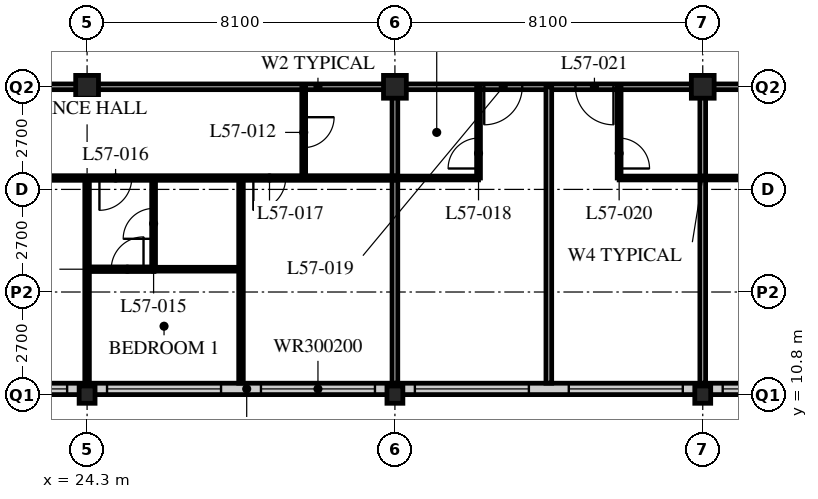
"""IFC4 building model, lengths in metres.
Left out: names, types, materials, properties, quantities, classifications, styles, units other than length and angle.
Written with IfcOpenShell. Run it as: python <this file> out.ifc"""

import sys

from ifc_helpers import new_model, si_unit, direction, frame, frame_2d, origin, origin_2d, place, context, subcontext, project, spatial, rectangle, hollow_rectangle, i_section, extrude, element, fill, save


model = new_model("IFC4")
c1 = context("Model", 3, precision=1e-05, world=origin(), true_north=direction((0.0, 1.0)))
c2 = subcontext(c1, "Body", "Model", "MODEL_VIEW")
j1 = project(units=[si_unit("LENGTHUNIT", "METRE"), si_unit("PLANEANGLEUNIT", "RADIAN")], contexts=[c1])
p1 = place(None, origin())
s1 = spatial("IfcSite", under=j1, at=p1, CompositionType="ELEMENT")
p2 = place(p1, origin())
s2 = spatial("IfcBuilding", under=s1, at=p2, CompositionType="ELEMENT")
p3 = place(p2, frame((0.0, 0.0, 220.8)))
s3 = spatial("IfcBuildingStorey", under=s2, at=p3, CompositionType="ELEMENT", Elevation=220.8)
p4 = place(p3, frame((24.3, 10.8, 0.0), z_axis=(0.0, 0.0, 1.0), x_axis=(1.0, 0.0, 0.0)))
e1 = element("IfcColumn", 1, at=p4, inside=s3, PredefinedType="COLUMN", context=c2, shape_type="SweptSolid", body=[
    extrude(i_section(OverallWidth=0.418, OverallDepth=0.456, WebThickness=0.042, FlangeThickness=0.067, FilletRadius=0.015, at=origin_2d()), origin(), (0.0, 0.0, 1.0), 3.6),
])
p5 = place(p3, frame((24.3, 18.9, 0.0), z_axis=(0.0, 0.0, 1.0), x_axis=(1.0, 0.0, 0.0)))
e2 = element("IfcColumn", 2, at=p5, inside=s3, PredefinedType="COLUMN", context=c2, shape_type="SweptSolid", body=[
    extrude(hollow_rectangle(XDim=0.6, YDim=0.6, WallThickness=0.05, at=origin_2d()), origin(), (0.0, 0.0, 1.0), 3.6),
])
p6 = place(p3, frame((32.4, 10.8, 0.0), z_axis=(0.0, 0.0, 1.0), x_axis=(1.0, 0.0, 0.0)))
e3 = element("IfcColumn", 3, at=p6, inside=s3, PredefinedType="COLUMN", context=c2, shape_type="SweptSolid", body=[
    extrude(i_section(OverallWidth=0.418, OverallDepth=0.456, WebThickness=0.042, FlangeThickness=0.067, FilletRadius=0.015, at=origin_2d()), origin(), (0.0, 0.0, 1.0), 3.6),
])
p7 = place(p3, frame((32.4, 18.9, 0.0), z_axis=(0.0, 0.0, 1.0), x_axis=(1.0, 0.0, 0.0)))
e4 = element("IfcColumn", 4, at=p7, inside=s3, PredefinedType="COLUMN", context=c2, shape_type="SweptSolid", body=[
    extrude(hollow_rectangle(XDim=0.6, YDim=0.6, WallThickness=0.05, at=origin_2d()), origin(), (0.0, 0.0, 1.0), 3.6),
])
p8 = place(p3, frame((40.5, 10.8, 0.0), z_axis=(0.0, 0.0, 1.0), x_axis=(1.0, 0.0, 0.0)))
e5 = element("IfcColumn", 5, at=p8, inside=s3, PredefinedType="COLUMN", context=c2, shape_type="SweptSolid", body=[
    extrude(i_section(OverallWidth=0.418, OverallDepth=0.456, WebThickness=0.042, FlangeThickness=0.067, FilletRadius=0.015, at=origin_2d()), origin(), (0.0, 0.0, 1.0), 3.6),
])
p9 = place(p3, frame((40.5, 18.9, 0.0), z_axis=(0.0, 0.0, 1.0), x_axis=(1.0, 0.0, 0.0)))
e6 = element("IfcColumn", 6, at=p9, inside=s3, PredefinedType="COLUMN", context=c2, shape_type="SweptSolid", body=[
    extrude(hollow_rectangle(XDim=0.6, YDim=0.6, WallThickness=0.05, at=origin_2d()), origin(), (0.0, 0.0, 1.0), 3.6),
])
p10 = place(p3, frame((8.4, 10.95, 0.0), z_axis=(0.0, 0.0, 1.0), x_axis=(1.0, 0.0, 0.0)))
e7 = element("IfcWall", 7, at=p10, inside=s3, PredefinedType="SOLIDWALL", context=c2, shape_type="SweptSolid", body=[
    extrude(rectangle(XDim=40.2, YDim=0.3, at=frame_2d((20.1, 0.0))), origin(), (0.0, 0.0, 1.0), 3.39),
])
p11 = place(p10, frame((0.225, 0.0, 0.6)))
e8 = element("IfcOpeningElement", 8, at=p11, cuts=e7, PredefinedType="OPENING", context=c2, shape_type="SweptSolid", body=[
    extrude(rectangle(XDim=3.0, YDim=2.0, at=frame_2d((1.5, 1.0))), frame((0.0, 0.16, 0.0), z_axis=(0.0, -1.0, 0.0), x_axis=(1.0, 0.0, 0.0)), (0.0, 0.0, 1.0), 0.32),
])
p12 = place(p10, frame((4.275, 0.0, 0.6)))
e9 = element("IfcOpeningElement", 9, at=p12, cuts=e7, PredefinedType="OPENING", context=c2, shape_type="SweptSolid", body=[
    extrude(rectangle(XDim=3.0, YDim=2.0, at=frame_2d((1.5, 1.0))), frame((0.0, 0.16, 0.0), z_axis=(0.0, -1.0, 0.0), x_axis=(1.0, 0.0, 0.0)), (0.0, 0.0, 1.0), 0.32),
])
p13 = place(p10, frame((8.325, 0.0, 0.6)))
e10 = element("IfcOpeningElement", 10, at=p13, cuts=e7, PredefinedType="OPENING", context=c2, shape_type="SweptSolid", body=[
    extrude(rectangle(XDim=3.0, YDim=2.0, at=frame_2d((1.5, 1.0))), frame((0.0, 0.16, 0.0), z_axis=(0.0, -1.0, 0.0), x_axis=(1.0, 0.0, 0.0)), (0.0, 0.0, 1.0), 0.32),
])
p14 = place(p10, frame((12.375, 0.0, 0.6)))
e11 = element("IfcOpeningElement", 11, at=p14, cuts=e7, PredefinedType="OPENING", context=c2, shape_type="SweptSolid", body=[
    extrude(rectangle(XDim=3.0, YDim=2.0, at=frame_2d((1.5, 1.0))), frame((0.0, 0.16, 0.0), z_axis=(0.0, -1.0, 0.0), x_axis=(1.0, 0.0, 0.0)), (0.0, 0.0, 1.0), 0.32),
])
p15 = place(p10, frame((16.425, 0.0, 0.6)))
e12 = element("IfcOpeningElement", 12, at=p15, cuts=e7, PredefinedType="OPENING", context=c2, shape_type="SweptSolid", body=[
    extrude(rectangle(XDim=3.0, YDim=2.0, at=frame_2d((1.5, 1.0))), frame((0.0, 0.16, 0.0), z_axis=(0.0, -1.0, 0.0), x_axis=(1.0, 0.0, 0.0)), (0.0, 0.0, 1.0), 0.32),
])
p16 = place(p10, frame((20.475, 0.0, 0.6)))
e13 = element("IfcOpeningElement", 13, at=p16, cuts=e7, PredefinedType="OPENING", context=c2, shape_type="SweptSolid", body=[
    extrude(rectangle(XDim=3.0, YDim=2.0, at=frame_2d((1.5, 1.0))), frame((0.0, 0.16, 0.0), z_axis=(0.0, -1.0, 0.0), x_axis=(1.0, 0.0, 0.0)), (0.0, 0.0, 1.0), 0.32),
])
p17 = place(p10, frame((24.525, 0.0, 0.6)))
e14 = element("IfcOpeningElement", 14, at=p17, cuts=e7, PredefinedType="OPENING", context=c2, shape_type="SweptSolid", body=[
    extrude(rectangle(XDim=3.0, YDim=2.0, at=frame_2d((1.5, 1.0))), frame((0.0, 0.16, 0.0), z_axis=(0.0, -1.0, 0.0), x_axis=(1.0, 0.0, 0.0)), (0.0, 0.0, 1.0), 0.32),
])
p18 = place(p10, frame((28.575, 0.0, 0.6)))
e15 = element("IfcOpeningElement", 15, at=p18, cuts=e7, PredefinedType="OPENING", context=c2, shape_type="SweptSolid", body=[
    extrude(rectangle(XDim=3.0, YDim=2.0, at=frame_2d((1.5, 1.0))), frame((0.0, 0.16, 0.0), z_axis=(0.0, -1.0, 0.0), x_axis=(1.0, 0.0, 0.0)), (0.0, 0.0, 1.0), 0.32),
])
p19 = place(p10, frame((32.625, 0.0, 0.6)))
e16 = element("IfcOpeningElement", 16, at=p19, cuts=e7, PredefinedType="OPENING", context=c2, shape_type="SweptSolid", body=[
    extrude(rectangle(XDim=3.0, YDim=2.0, at=frame_2d((1.5, 1.0))), frame((0.0, 0.16, 0.0), z_axis=(0.0, -1.0, 0.0), x_axis=(1.0, 0.0, 0.0)), (0.0, 0.0, 1.0), 0.32),
])
p20 = place(p10, frame((36.675, 0.0, 0.6)))
e17 = element("IfcOpeningElement", 17, at=p20, cuts=e7, PredefinedType="OPENING", context=c2, shape_type="SweptSolid", body=[
    extrude(rectangle(XDim=3.0, YDim=2.0, at=frame_2d((1.5, 1.0))), frame((0.0, 0.16, 0.0), z_axis=(0.0, -1.0, 0.0), x_axis=(1.0, 0.0, 0.0)), (0.0, 0.0, 1.0), 0.32),
])
p21 = place(p3, frame((12.15, 18.9, 0.0), z_axis=(0.0, 0.0, 1.0), x_axis=(1.0, 0.0, 0.0)))
e18 = element("IfcWall", 18, at=p21, inside=s3, PredefinedType="PARTITIONING", context=c2, shape_type="SweptSolid", body=[
    extrude(rectangle(XDim=36.45, YDim=0.15, at=frame_2d((18.225, 0.0))), origin(), (0.0, 0.0, 1.0), 2.628),
])
p22 = place(p21, frame((4.95, 0.0, 0.0)))
e19 = element("IfcOpeningElement", 19, at=p22, cuts=e18, PredefinedType="OPENING", context=c2, shape_type="SweptSolid", body=[
    extrude(rectangle(XDim=1.0, YDim=2.1, at=frame_2d((0.5, 1.05))), frame((0.0, 0.085, 0.0), z_axis=(0.0, -1.0, 0.0), x_axis=(1.0, 0.0, 0.0)), (0.0, 0.0, 1.0), 0.17),
])
p23 = place(p21, frame((22.6, 0.0, 0.0)))
e20 = element("IfcOpeningElement", 20, at=p23, cuts=e18, PredefinedType="OPENING", context=c2, shape_type="SweptSolid", body=[
    extrude(rectangle(XDim=1.0, YDim=2.1, at=frame_2d((0.5, 1.05))), frame((0.0, 0.085, 0.0), z_axis=(0.0, -1.0, 0.0), x_axis=(1.0, 0.0, 0.0)), (0.0, 0.0, 1.0), 0.17),
])
p24 = place(p21, frame((25.0, 0.0, 0.0)))
e21 = element("IfcOpeningElement", 21, at=p24, cuts=e18, PredefinedType="OPENING", context=c2, shape_type="SweptSolid", body=[
    extrude(rectangle(XDim=1.0, YDim=2.1, at=frame_2d((0.5, 1.05))), frame((0.0, 0.085, 0.0), z_axis=(0.0, -1.0, 0.0), x_axis=(1.0, 0.0, 0.0)), (0.0, 0.0, 1.0), 0.17),
])
p25 = place(p21, frame((30.7, 0.0, 0.0)))
e22 = element("IfcOpeningElement", 22, at=p25, cuts=e18, PredefinedType="OPENING", context=c2, shape_type="SweptSolid", body=[
    extrude(rectangle(XDim=1.0, YDim=2.1, at=frame_2d((0.5, 1.05))), frame((0.0, 0.085, 0.0), z_axis=(0.0, -1.0, 0.0), x_axis=(1.0, 0.0, 0.0)), (0.0, 0.0, 1.0), 0.17),
])
p26 = place(p21, frame((1.525, 0.0, 0.0)))
e23 = element("IfcOpeningElement", 23, at=p26, cuts=e18, PredefinedType="OPENING", context=c2, shape_type="SweptSolid", body=[
    extrude(rectangle(XDim=1.0, YDim=2.1, at=frame_2d((0.5, 1.05))), frame((0.0, 0.085, 0.0), z_axis=(0.0, -1.0, 0.0), x_axis=(1.0, 0.0, 0.0)), (0.0, 0.0, 1.0), 0.17),
])
p27 = place(p21, frame((32.825, 0.0, 0.0)))
e24 = element("IfcOpeningElement", 24, at=p27, cuts=e18, PredefinedType="OPENING", context=c2, shape_type="SweptSolid", body=[
    extrude(rectangle(XDim=1.0, YDim=2.1, at=frame_2d((0.5, 1.05))), frame((0.0, 0.085, 0.0), z_axis=(0.0, -1.0, 0.0), x_axis=(1.0, 0.0, 0.0)), (0.0, 0.0, 1.0), 0.17),
])
p28 = place(p3, frame((30.0, 18.9, 0.0), z_axis=(0.0, 0.0, 1.0), x_axis=(0.0, -1.0, 0.0)))
e25 = element("IfcWall", 25, at=p28, inside=s3, PredefinedType="PARTITIONING", context=c2, shape_type="SweptSolid", body=[
    extrude(rectangle(XDim=2.4, YDim=0.1, at=frame_2d((1.2, 0.0))), origin(), (0.0, 0.0, 1.0), 3.39),
])
p29 = place(p28, frame((0.8, 0.0, 0.0)))
e26 = element("IfcOpeningElement", 26, at=p29, cuts=e25, PredefinedType="OPENING", context=c2, shape_type="SweptSolid", body=[
    extrude(rectangle(XDim=0.8, YDim=2.1, at=frame_2d((0.4, 1.05))), frame((0.0, 0.06, 0.0), z_axis=(0.0, -1.0, 0.0), x_axis=(1.0, 0.0, 0.0)), (0.0, 0.0, 1.0), 0.12),
])
p30 = place(p3, frame((26.05, 16.5, 0.0), z_axis=(0.0, 0.0, 1.0), x_axis=(0.0, -1.0, 0.0)))
e27 = element("IfcWall", 27, at=p30, inside=s3, PredefinedType="PARTITIONING", context=c2, shape_type="SweptSolid", body=[
    extrude(rectangle(XDim=2.4, YDim=0.1, at=frame_2d((1.2, 0.0))), origin(), (0.0, 0.0, 1.0), 3.39),
])
p31 = place(p30, frame((0.8, 0.0, 0.0)))
e28 = element("IfcOpeningElement", 28, at=p31, cuts=e27, PredefinedType="OPENING", context=c2, shape_type="SweptSolid", body=[
    extrude(rectangle(XDim=0.8, YDim=2.1, at=frame_2d((0.4, 1.05))), frame((0.0, 0.06, 0.0), z_axis=(0.0, -1.0, 0.0), x_axis=(1.0, 0.0, 0.0)), (0.0, 0.0, 1.0), 0.12),
])
p32 = place(p3, frame((26.05, 14.1, 0.0), z_axis=(0.0, 0.0, 1.0), x_axis=(1.0, 0.0, 0.0)))
e29 = element("IfcWall", 29, at=p32, inside=s3, PredefinedType="PARTITIONING", context=c2, shape_type="SweptSolid", body=[
    extrude(rectangle(XDim=2.3, YDim=0.1, at=frame_2d((1.15, 0.0))), origin(), (0.0, 0.0, 1.0), 3.39),
])
p33 = place(p3, frame((24.3, 16.5, 0.0), z_axis=(0.0, 0.0, 1.0), x_axis=(0.0, -1.0, 0.0)))
e30 = element("IfcWall", 30, at=p33, inside=s3, PredefinedType="PARTITIONING", context=c2, shape_type="SweptSolid", body=[
    extrude(rectangle(XDim=5.4, YDim=0.12, at=frame_2d((2.7, 0.0))), origin(), (0.0, 0.0, 1.0), 2.628),
])
p34 = place(p3, frame((28.35, 16.5, 0.0), z_axis=(0.0, 0.0, 1.0), x_axis=(0.0, -1.0, 0.0)))
e31 = element("IfcWall", 31, at=p34, inside=s3, PredefinedType="PARTITIONING", context=c2, shape_type="SweptSolid", body=[
    extrude(rectangle(XDim=5.4, YDim=0.12, at=frame_2d((2.7, 0.0))), origin(), (0.0, 0.0, 1.0), 3.39),
])
p35 = place(p3, frame((32.4, 18.9, 0.0), z_axis=(0.0, 0.0, 1.0), x_axis=(0.0, -1.0, 0.0)))
e32 = element("IfcWall", 32, at=p35, inside=s3, PredefinedType="PARTITIONING", context=c2, shape_type="SweptSolid", body=[
    extrude(rectangle(XDim=7.8, YDim=0.15, at=frame_2d((3.9, 0.0))), origin(), (0.0, 0.0, 1.0), 2.628),
])
p36 = place(p3, frame((32.4, 16.5, 0.0), z_axis=(0.0, 0.0, 1.0), x_axis=(1.0, 0.0, 0.0)))
e33 = element("IfcWall", 33, at=p36, inside=s3, PredefinedType="PARTITIONING", context=c2, shape_type="SweptSolid", body=[
    extrude(rectangle(XDim=2.2, YDim=0.1, at=frame_2d((1.1, 0.0))), origin(), (0.0, 0.0, 1.0), 3.39),
])
p37 = place(p3, frame((34.6, 18.9, 0.0), z_axis=(0.0, 0.0, 1.0), x_axis=(0.0, -1.0, 0.0)))
e34 = element("IfcWall", 34, at=p37, inside=s3, PredefinedType="PARTITIONING", context=c2, shape_type="SweptSolid", body=[
    extrude(rectangle(XDim=2.4, YDim=0.1, at=frame_2d((1.2, 0.0))), origin(), (0.0, 0.0, 1.0), 3.39),
])
p38 = place(p37, frame((1.35, 0.0, 0.0)))
e35 = element("IfcOpeningElement", 35, at=p38, cuts=e34, PredefinedType="OPENING", context=c2, shape_type="SweptSolid", body=[
    extrude(rectangle(XDim=0.8, YDim=2.1, at=frame_2d((0.4, 1.05))), frame((0.0, 0.06, 0.0), z_axis=(0.0, -1.0, 0.0), x_axis=(1.0, 0.0, 0.0)), (0.0, 0.0, 1.0), 0.12),
])
p39 = place(p3, frame((36.45, 18.9, 0.0), z_axis=(0.0, 0.0, 1.0), x_axis=(0.0, -1.0, 0.0)))
e36 = element("IfcWall", 36, at=p39, inside=s3, PredefinedType="PARTITIONING", context=c2, shape_type="SweptSolid", body=[
    extrude(rectangle(XDim=7.8, YDim=0.15, at=frame_2d((3.9, 0.0))), origin(), (0.0, 0.0, 1.0), 3.39),
])
p40 = place(p3, frame((38.3, 16.5, 0.0), z_axis=(0.0, 0.0, 1.0), x_axis=(1.0, 0.0, 0.0)))
e37 = element("IfcWall", 37, at=p40, inside=s3, PredefinedType="PARTITIONING", context=c2, shape_type="SweptSolid", body=[
    extrude(rectangle(XDim=4.4, YDim=0.1, at=frame_2d((2.2, 0.0))), origin(), (0.0, 0.0, 1.0), 3.39),
])
p41 = place(p3, frame((38.3, 18.9, 0.0), z_axis=(0.0, 0.0, 1.0), x_axis=(0.0, -1.0, 0.0)))
e38 = element("IfcWall", 38, at=p41, inside=s3, PredefinedType="PARTITIONING", context=c2, shape_type="SweptSolid", body=[
    extrude(rectangle(XDim=2.4, YDim=0.1, at=frame_2d((1.2, 0.0))), origin(), (0.0, 0.0, 1.0), 3.39),
])
p42 = place(p41, frame((1.35, 0.0, 0.0)))
e39 = element("IfcOpeningElement", 39, at=p42, cuts=e38, PredefinedType="OPENING", context=c2, shape_type="SweptSolid", body=[
    extrude(rectangle(XDim=0.8, YDim=2.1, at=frame_2d((0.4, 1.05))), frame((0.0, 0.06, 0.0), z_axis=(0.0, -1.0, 0.0), x_axis=(1.0, 0.0, 0.0)), (0.0, 0.0, 1.0), 0.12),
])
p43 = place(p3, frame((40.5, 18.9, 0.0), z_axis=(0.0, 0.0, 1.0), x_axis=(0.0, -1.0, 0.0)))
e40 = element("IfcWall", 40, at=p43, inside=s3, PredefinedType="PARTITIONING", context=c2, shape_type="SweptSolid", body=[
    extrude(rectangle(XDim=7.8, YDim=0.15, at=frame_2d((3.9, 0.0))), origin(), (0.0, 0.0, 1.0), 2.628),
])
p44 = place(p3, frame((8.15, 16.5, 0.0), z_axis=(0.0, 0.0, 1.0), x_axis=(1.0, 0.0, 0.0)))
e41 = element("IfcWall", 41, at=p44, inside=s3, PredefinedType="PARTITIONING", context=c2, shape_type="SweptSolid", body=[
    extrude(rectangle(XDim=24.25, YDim=0.12, at=frame_2d((12.125, 0.0))), origin(), (0.0, 0.0, 1.0), 3.39),
])
p45 = place(p44, frame((9.025, 0.0, 0.0)))
e42 = element("IfcOpeningElement", 42, at=p45, cuts=e41, PredefinedType="OPENING", context=c2, shape_type="SweptSolid", body=[
    extrude(rectangle(XDim=0.85, YDim=2.1, at=frame_2d((0.425, 1.05))), frame((0.0, 0.07, 0.0), z_axis=(0.0, -1.0, 0.0), x_axis=(1.0, 0.0, 0.0)), (0.0, 0.0, 1.0), 0.14),
])
p46 = place(p44, frame((16.475, 0.0, 0.0)))
e43 = element("IfcOpeningElement", 43, at=p46, cuts=e41, PredefinedType="OPENING", context=c2, shape_type="SweptSolid", body=[
    extrude(rectangle(XDim=0.85, YDim=2.1, at=frame_2d((0.425, 1.05))), frame((0.0, 0.07, 0.0), z_axis=(0.0, -1.0, 0.0), x_axis=(1.0, 0.0, 0.0)), (0.0, 0.0, 1.0), 0.14),
])
p47 = place(p44, frame((20.525, 0.0, 0.0)))
e44 = element("IfcOpeningElement", 44, at=p47, cuts=e41, PredefinedType="OPENING", context=c2, shape_type="SweptSolid", body=[
    extrude(rectangle(XDim=0.85, YDim=2.1, at=frame_2d((0.425, 1.05))), frame((0.0, 0.07, 0.0), z_axis=(0.0, -1.0, 0.0), x_axis=(1.0, 0.0, 0.0)), (0.0, 0.0, 1.0), 0.14),
])
p48 = place(p44, frame((6.725, 0.0, 0.0)))
e45 = element("IfcOpeningElement", 45, at=p48, cuts=e41, PredefinedType="OPENING", context=c2, shape_type="SweptSolid", body=[
    extrude(rectangle(XDim=0.85, YDim=2.1, at=frame_2d((0.425, 1.05))), frame((0.0, 0.07, 0.0), z_axis=(0.0, -1.0, 0.0), x_axis=(1.0, 0.0, 0.0)), (0.0, 0.0, 1.0), 0.14),
])
p49 = place(p44, frame((2.875, 0.0, 0.0)))
e46 = element("IfcOpeningElement", 46, at=p49, cuts=e41, PredefinedType="OPENING", context=c2, shape_type="SweptSolid", body=[
    extrude(rectangle(XDim=0.85, YDim=2.1, at=frame_2d((0.425, 1.05))), frame((0.0, 0.07, 0.0), z_axis=(0.0, -1.0, 0.0), x_axis=(1.0, 0.0, 0.0)), (0.0, 0.0, 1.0), 0.14),
])
p50 = place(p3, frame((26.06, 14.1, 0.0), z_axis=(0.0, 0.0, 1.0), x_axis=(-1.0, 0.0, 0.0)))
e47 = element("IfcWall", 47, at=p50, inside=s3, PredefinedType="PARTITIONING", context=c2, shape_type="SweptSolid", body=[
    extrude(rectangle(XDim=1.76, YDim=0.12, at=frame_2d((0.88, 0.0))), origin(), (0.0, 0.0, 1.0), 3.39),
])
p51 = place(p50, frame((0.275, 0.0, 0.0)))
e48 = element("IfcOpeningElement", 48, at=p51, cuts=e47, PredefinedType="OPENING", context=c2, shape_type="SweptSolid", body=[
    extrude(rectangle(XDim=0.85, YDim=2.1, at=frame_2d((0.425, 1.05))), frame((0.0, 0.07, 0.0), z_axis=(0.0, -1.0, 0.0), x_axis=(1.0, 0.0, 0.0)), (0.0, 0.0, 1.0), 0.14),
])
p52 = place(p14, origin())
e49 = element("IfcWindow", 49, at=p52, inside=s3, PartitioningType="SINGLE_PANEL", PredefinedType="WINDOW", context=c2, shape_type="SweptSolid", body=[
    extrude(rectangle(XDim=3.0, YDim=2.0, at=frame_2d((1.5, 1.0))), frame((0.0, 0.03, 0.0), z_axis=(0.0, -1.0, 0.0), x_axis=(1.0, 0.0, 0.0)), (0.0, 0.0, 1.0), 0.06),
])
fill(e11, e49)
p53 = place(p15, origin())
e50 = element("IfcWindow", 50, at=p53, inside=s3, PartitioningType="SINGLE_PANEL", PredefinedType="WINDOW", context=c2, shape_type="SweptSolid", body=[
    extrude(rectangle(XDim=3.0, YDim=2.0, at=frame_2d((1.5, 1.0))), frame((0.0, 0.03, 0.0), z_axis=(0.0, -1.0, 0.0), x_axis=(1.0, 0.0, 0.0)), (0.0, 0.0, 1.0), 0.06),
])
fill(e12, e50)
p54 = place(p16, origin())
e51 = element("IfcWindow", 51, at=p54, inside=s3, PartitioningType="SINGLE_PANEL", PredefinedType="WINDOW", context=c2, shape_type="SweptSolid", body=[
    extrude(rectangle(XDim=3.0, YDim=2.0, at=frame_2d((1.5, 1.0))), frame((0.0, 0.03, 0.0), z_axis=(0.0, -1.0, 0.0), x_axis=(1.0, 0.0, 0.0)), (0.0, 0.0, 1.0), 0.06),
])
fill(e13, e51)
p55 = place(p17, origin())
e52 = element("IfcWindow", 52, at=p55, inside=s3, PartitioningType="SINGLE_PANEL", PredefinedType="WINDOW", context=c2, shape_type="SweptSolid", body=[
    extrude(rectangle(XDim=3.0, YDim=2.0, at=frame_2d((1.5, 1.0))), frame((0.0, 0.03, 0.0), z_axis=(0.0, -1.0, 0.0), x_axis=(1.0, 0.0, 0.0)), (0.0, 0.0, 1.0), 0.06),
])
fill(e14, e52)
p56 = place(p18, origin())
e53 = element("IfcWindow", 53, at=p56, inside=s3, PartitioningType="SINGLE_PANEL", PredefinedType="WINDOW", context=c2, shape_type="SweptSolid", body=[
    extrude(rectangle(XDim=3.0, YDim=2.0, at=frame_2d((1.5, 1.0))), frame((0.0, 0.03, 0.0), z_axis=(0.0, -1.0, 0.0), x_axis=(1.0, 0.0, 0.0)), (0.0, 0.0, 1.0), 0.06),
])
fill(e15, e53)
p57 = place(p19, origin())
e54 = element("IfcWindow", 54, at=p57, inside=s3, PartitioningType="SINGLE_PANEL", PredefinedType="WINDOW", context=c2, shape_type="SweptSolid", body=[
    extrude(rectangle(XDim=3.0, YDim=2.0, at=frame_2d((1.5, 1.0))), frame((0.0, 0.03, 0.0), z_axis=(0.0, -1.0, 0.0), x_axis=(1.0, 0.0, 0.0)), (0.0, 0.0, 1.0), 0.06),
])
fill(e16, e54)
p58 = place(p29, origin())
e55 = element("IfcDoor", 55, at=p58, inside=s3, OperationType="SINGLE_SWING_LEFT", PredefinedType="DOOR", context=c2, shape_type="SweptSolid", body=[
    extrude(rectangle(XDim=0.8, YDim=2.1, at=frame_2d((0.4, 1.05))), frame((0.0, 0.025, 0.0), z_axis=(0.0, -1.0, 0.0), x_axis=(1.0, 0.0, 0.0)), (0.0, 0.0, 1.0), 0.05),
])
fill(e26, e55)
p59 = place(p31, origin())
e56 = element("IfcDoor", 56, at=p59, inside=s3, OperationType="SINGLE_SWING_LEFT", PredefinedType="DOOR", context=c2, shape_type="SweptSolid", body=[
    extrude(rectangle(XDim=0.8, YDim=2.1, at=frame_2d((0.4, 1.05))), frame((0.0, 0.025, 0.0), z_axis=(0.0, -1.0, 0.0), x_axis=(1.0, 0.0, 0.0)), (0.0, 0.0, 1.0), 0.05),
])
fill(e28, e56)
p60 = place(p46, origin())
e57 = element("IfcDoor", 57, at=p60, inside=s3, OperationType="SINGLE_SWING_RIGHT", PredefinedType="DOOR", context=c2, shape_type="SweptSolid", body=[
    extrude(rectangle(XDim=0.85, YDim=2.1, at=frame_2d((0.425, 1.05))), frame((0.0, 0.025, 0.0), z_axis=(0.0, -1.0, 0.0), x_axis=(1.0, 0.0, 0.0)), (0.0, 0.0, 1.0), 0.05),
])
fill(e43, e57)
p61 = place(p47, origin())
e58 = element("IfcDoor", 58, at=p61, inside=s3, OperationType="SINGLE_SWING_RIGHT", PredefinedType="DOOR", context=c2, shape_type="SweptSolid", body=[
    extrude(rectangle(XDim=0.85, YDim=2.1, at=frame_2d((0.425, 1.05))), frame((0.0, 0.025, 0.0), z_axis=(0.0, -1.0, 0.0), x_axis=(1.0, 0.0, 0.0)), (0.0, 0.0, 1.0), 0.05),
])
fill(e44, e58)
p62 = place(p38, origin())
e59 = element("IfcDoor", 59, at=p62, inside=s3, OperationType="SINGLE_SWING_LEFT", PredefinedType="DOOR", context=c2, shape_type="SweptSolid", body=[
    extrude(rectangle(XDim=0.8, YDim=2.1, at=frame_2d((0.4, 1.05))), frame((0.0, 0.025, 0.0), z_axis=(0.0, -1.0, 0.0), x_axis=(1.0, 0.0, 0.0)), (0.0, 0.0, 1.0), 0.05),
])
fill(e35, e59)
p63 = place(p23, origin())
e60 = element("IfcDoor", 60, at=p63, inside=s3, OperationType="SINGLE_SWING_RIGHT", PredefinedType="DOOR", context=c2, shape_type="SweptSolid", body=[
    extrude(rectangle(XDim=1.0, YDim=2.1, at=frame_2d((0.5, 1.05))), frame((0.0, 0.025, 0.0), z_axis=(0.0, -1.0, 0.0), x_axis=(1.0, 0.0, 0.0)), (0.0, 0.0, 1.0), 0.05),
])
fill(e20, e60)
p64 = place(p42, origin())
e61 = element("IfcDoor", 61, at=p64, inside=s3, OperationType="SINGLE_SWING_RIGHT", PredefinedType="DOOR", context=c2, shape_type="SweptSolid", body=[
    extrude(rectangle(XDim=0.8, YDim=2.1, at=frame_2d((0.4, 1.05))), frame((0.0, 0.025, 0.0), z_axis=(0.0, -1.0, 0.0), x_axis=(1.0, 0.0, 0.0)), (0.0, 0.0, 1.0), 0.05),
])
fill(e39, e61)
p65 = place(p24, origin())
e62 = element("IfcDoor", 62, at=p65, inside=s3, OperationType="SINGLE_SWING_LEFT", PredefinedType="DOOR", context=c2, shape_type="SweptSolid", body=[
    extrude(rectangle(XDim=1.0, YDim=2.1, at=frame_2d((0.5, 1.05))), frame((0.0, 0.025, 0.0), z_axis=(0.0, -1.0, 0.0), x_axis=(1.0, 0.0, 0.0)), (0.0, 0.0, 1.0), 0.05),
])
fill(e21, e62)
p66 = place(p51, origin())
e63 = element("IfcDoor", 63, at=p66, inside=s3, OperationType="SINGLE_SWING_RIGHT", PredefinedType="DOOR", context=c2, shape_type="SweptSolid", body=[
    extrude(rectangle(XDim=0.85, YDim=2.1, at=frame_2d((0.425, 1.05))), frame((0.0, 0.025, 0.0), z_axis=(0.0, -1.0, 0.0), x_axis=(1.0, 0.0, 0.0)), (0.0, 0.0, 1.0), 0.05),
])
fill(e48, e63)
save(model, sys.argv[1])
